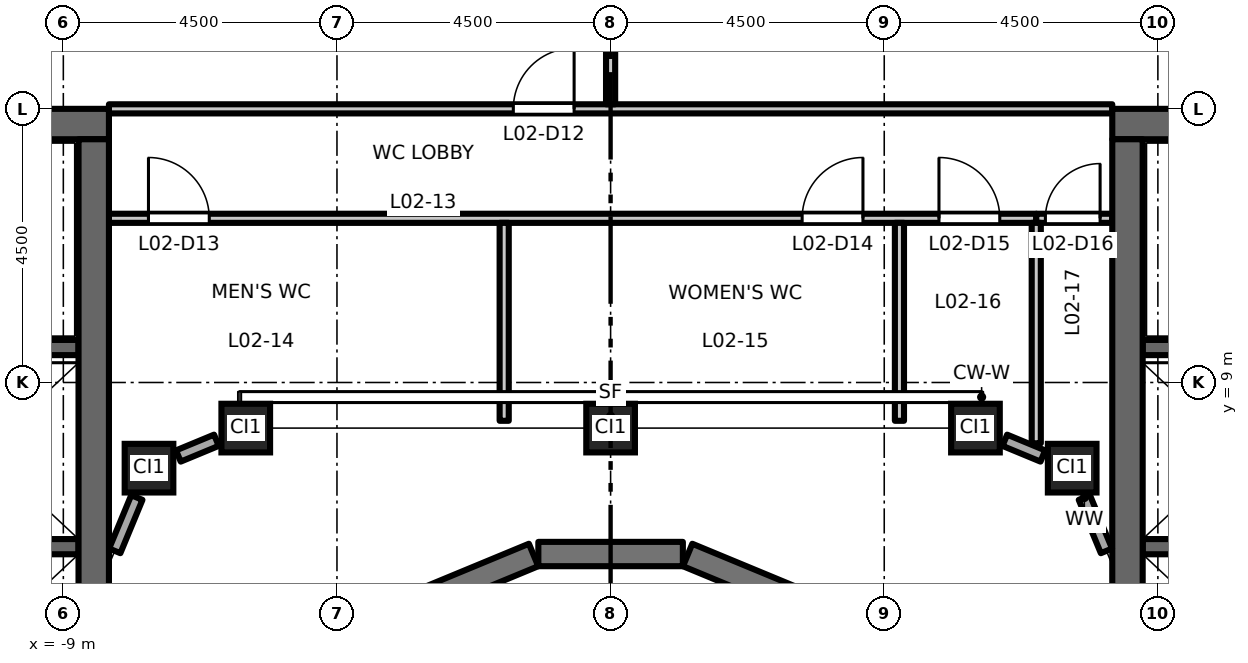
"""IFC4 building model, lengths in metres.
Left out: names, types, materials, properties, quantities, classifications, styles, units other than length and angle.
Written with IfcOpenShell. Run it as: python <this file> out.ifc"""

import sys

from ifc_helpers import new_model, si_unit, direction, frame, frame_2d, origin, origin_2d, place, context, subcontext, project, spatial, rectangle, hollow_rectangle, extrude, element, fill, save


model = new_model("IFC4")
c1 = context("Model", 3, precision=1e-05, world=origin(), true_north=direction((0.0, 1.0)))
c2 = subcontext(c1, "Body", "Model", "MODEL_VIEW")
j1 = project(units=[si_unit("LENGTHUNIT", "METRE"), si_unit("PLANEANGLEUNIT", "RADIAN")], contexts=[c1])
p1 = place(None, origin())
s1 = spatial("IfcSite", under=j1, at=p1, CompositionType="ELEMENT")
p2 = place(p1, origin())
s2 = spatial("IfcBuilding", under=s1, at=p2, CompositionType="ELEMENT")
p3 = place(p2, frame((0.0, 0.0, 12.2)))
s3 = spatial("IfcBuildingStorey", under=s2, at=p3, CompositionType="ELEMENT", Elevation=12.2)
for number, where, z_axis, x_axis in (
    (1, (-7.591, 7.591, 0.0), (0.0, 0.0, 1.0), (1.0, 0.0, 0.0)),
    (2, (-6.0, 8.25, 0.0), (0.0, 0.0, 1.0), (1.0, 0.0, 0.0)),
    (3, (0.0, 8.25, 0.0), (0.0, 0.0, 1.0), (1.0, 0.0, 0.0)),
    (4, (6.0, 8.25, 0.0), (0.0, 0.0, 1.0), (1.0, 0.0, 0.0)),
    (5, (7.591, 7.591, 0.0), (0.0, 0.0, 1.0), (1.0, 0.0, 0.0)),
):
    element("IfcColumn", number, at=place(p3, frame(where, z_axis=z_axis, x_axis=x_axis)), inside=s3, PredefinedType="COLUMN", context=c2, shape_type="SweptSolid", body=[
        extrude(hollow_rectangle(XDim=0.8, YDim=0.8, WallThickness=0.05, at=origin_2d()), origin(), (0.0, 0.0, 1.0), 5.0),
    ])
p4 = place(p3, frame((-8.75, 6.3, 0.0), z_axis=(0.0, 0.0, 1.0), x_axis=(-1.0, 0.0, 0.0)))
e6 = element("IfcWall", 6, at=p4, inside=s3, PredefinedType="SHEAR", context=c2, shape_type="SweptSolid", body=[
    extrude(rectangle(XDim=3.1, YDim=0.25, at=frame_2d((1.55, 0.0))), origin(), (0.0, 0.0, 1.0), 4.85),
])
p5 = place(p3, frame((-8.75, 9.575, 0.0), z_axis=(0.0, 0.0, 1.0), x_axis=(-1.0, 0.0, 0.0)))
e7 = element("IfcWall", 7, at=p5, inside=s3, PredefinedType="SHEAR", context=c2, shape_type="SweptSolid", body=[
    extrude(rectangle(XDim=8.0, YDim=0.25, at=frame_2d((4.0, 0.0))), origin(), (0.0, 0.0, 1.0), 4.85),
])
p6 = place(p5, frame((6.65, 0.0, 0.0)))
e8 = element("IfcOpeningElement", 8, at=p6, cuts=e7, PredefinedType="OPENING", context=c2, shape_type="SweptSolid", body=[
    extrude(rectangle(XDim=1.1, YDim=2.1, at=frame_2d((0.55, 1.05))), frame((0.0, 0.135, 0.0), z_axis=(0.0, -1.0, 0.0), x_axis=(1.0, 0.0, 0.0)), (0.0, 0.0, 1.0), 0.27),
])
p7 = place(p3, frame((-8.25, 13.25, 0.0), z_axis=(0.0, 0.0, 1.0), x_axis=(-1.0, 0.0, 0.0)))
e9 = element("IfcWall", 9, at=p7, inside=s3, PredefinedType="SHEAR", context=c2, shape_type="SweptSolid", body=[
    extrude(rectangle(XDim=13.5, YDim=0.5, at=frame_2d((6.75, 0.0))), origin(), (0.0, 0.0, 1.0), 4.85),
])
p8 = place(p3, frame((-8.5, -13.0, 0.0), z_axis=(0.0, 0.0, 1.0), x_axis=(0.0, 1.0, 0.0)))
e10 = element("IfcWall", 10, at=p8, inside=s3, PredefinedType="SHEAR", context=c2, shape_type="SweptSolid", body=[
    extrude(rectangle(XDim=26.0, YDim=0.5, at=frame_2d((13.0, 0.0))), origin(), (0.0, 0.0, 1.0), 4.85),
])
p9 = place(p3, frame((8.75, 6.3, 0.0), z_axis=(0.0, 0.0, 1.0), x_axis=(1.0, 0.0, 0.0)))
e11 = element("IfcWall", 11, at=p9, inside=s3, PredefinedType="SHEAR", context=c2, shape_type="SweptSolid", body=[
    extrude(rectangle(XDim=3.1, YDim=0.25, at=frame_2d((1.55, 0.0))), origin(), (0.0, 0.0, 1.0), 4.85),
])
p10 = place(p3, frame((8.75, 9.575, 0.0), z_axis=(0.0, 0.0, 1.0), x_axis=(1.0, 0.0, 0.0)))
e12 = element("IfcWall", 12, at=p10, inside=s3, PredefinedType="SHEAR", context=c2, shape_type="SweptSolid", body=[
    extrude(rectangle(XDim=8.0, YDim=0.25, at=frame_2d((4.0, 0.0))), origin(), (0.0, 0.0, 1.0), 4.85),
])
p11 = place(p10, frame((6.65, 0.0, 0.0)))
e13 = element("IfcOpeningElement", 13, at=p11, cuts=e12, PredefinedType="OPENING", context=c2, shape_type="SweptSolid", body=[
    extrude(rectangle(XDim=1.1, YDim=2.1, at=frame_2d((0.55, 1.05))), frame((0.0, 0.135, 0.0), z_axis=(0.0, -1.0, 0.0), x_axis=(1.0, 0.0, 0.0)), (0.0, 0.0, 1.0), 0.27),
])
p12 = place(p3, frame((8.25, 13.25, 0.0), z_axis=(0.0, 0.0, 1.0), x_axis=(1.0, 0.0, 0.0)))
e14 = element("IfcWall", 14, at=p12, inside=s3, PredefinedType="SHEAR", context=c2, shape_type="SweptSolid", body=[
    extrude(rectangle(XDim=13.5, YDim=0.5, at=frame_2d((6.75, 0.0))), origin(), (0.0, 0.0, 1.0), 4.85),
])
p13 = place(p3, frame((8.5, -13.0, 0.0), z_axis=(0.0, 0.0, 1.0), x_axis=(0.0, 1.0, 0.0)))
e15 = element("IfcWall", 15, at=p13, inside=s3, PredefinedType="SHEAR", context=c2, shape_type="SweptSolid", body=[
    extrude(rectangle(XDim=26.0, YDim=0.5, at=frame_2d((13.0, 0.0))), origin(), (0.0, 0.0, 1.0), 4.85),
])
p14 = place(p3, frame((8.154, 6.231, 0.0), z_axis=(0.0, 0.0, 1.0), x_axis=(-0.382624318388, 0.923904016107, 0.0)))
e16 = element("IfcWall", 16, at=p14, inside=s3, PredefinedType="STANDARD", context=c2, shape_type="SweptSolid", body=[
    extrude(rectangle(XDim=0.949, YDim=0.2, at=frame_2d((0.475, 0.0))), origin(), (0.0, 0.0, 1.0), 4.23),
])
for number, where, z_axis, x_axis in (
    (17, (7.108, 7.791, 0.0), (0.0, 0.0, 1.0), (-0.924, 0.383, 0.0)),
    (18, (-6.483, 8.05, 0.0), (0.0, 0.0, 1.0), (-0.924, -0.383, 0.0)),
):
    element("IfcWall", number, at=place(p3, frame(where, z_axis=z_axis, x_axis=x_axis)), inside=s3, PredefinedType="STANDARD", context=c2, shape_type="SweptSolid", body=[
        extrude(rectangle(XDim=0.677, YDim=0.2, at=frame_2d((0.338, 0.0))), origin(), (0.0, 0.0, 1.0), 4.23),
    ])
p15 = place(p3, frame((-7.791, 7.108, 0.0), z_axis=(0.0, 0.0, 1.0), x_axis=(-0.382624318388, -0.923904016107, 0.0)))
e19 = element("IfcWall", 19, at=p15, inside=s3, PredefinedType="STANDARD", context=c2, shape_type="SweptSolid", body=[
    extrude(rectangle(XDim=0.949, YDim=0.2, at=frame_2d((0.475, 0.0))), origin(), (0.0, 0.0, 1.0), 4.23),
])
for number, where, z_axis, x_axis in (
    (20, (3.462, 5.254, 0.0), (0.0, 0.0, 1.0), (-0.924, 0.383, 0.0)),
    (21, (1.188, 6.179, 0.0), (0.0, 0.0, 1.0), (-1.0, 0.0, 0.0)),
    (22, (-1.267, 6.163, 0.0), (0.0, 0.0, 1.0), (-0.924, -0.383, 0.0)),
):
    element("IfcWall", number, at=place(p3, frame(where, z_axis=z_axis, x_axis=x_axis)), inside=s3, PredefinedType="SOLIDWALL", context=c2, shape_type="SweptSolid", body=[
        extrude(rectangle(XDim=2.376, YDim=0.4, at=frame_2d((1.188, 0.0))), origin(), (0.0, 0.0, 1.0), 4.7),
    ])
p16 = place(p3, frame((-8.25, 11.7, 0.0), z_axis=(0.0, 0.0, 1.0), x_axis=(1.0, 0.0, 0.0)))
e23 = element("IfcWall", 23, at=p16, inside=s3, PredefinedType="PARTITIONING", context=c2, shape_type="SweptSolid", body=[
    extrude(rectangle(XDim=15.25, YDim=0.15, at=frame_2d((7.625, 0.0))), origin(), (0.0, 0.0, 1.0), 4.85),
])
p17 = place(p16, frame((0.65, 0.0, 0.0)))
e24 = element("IfcOpeningElement", 24, at=p17, cuts=e23, PredefinedType="OPENING", context=c2, shape_type="SweptSolid", body=[
    extrude(rectangle(XDim=1.0, YDim=2.1, at=frame_2d((0.5, 1.05))), frame((0.0, 0.085, 0.0), z_axis=(0.0, -1.0, 0.0), x_axis=(1.0, 0.0, 0.0)), (0.0, 0.0, 1.0), 0.17),
])
p18 = place(p16, frame((11.4, 0.0, 0.0)))
e25 = element("IfcOpeningElement", 25, at=p18, cuts=e23, PredefinedType="OPENING", context=c2, shape_type="SweptSolid", body=[
    extrude(rectangle(XDim=1.0, YDim=2.1, at=frame_2d((0.5, 1.05))), frame((0.0, 0.085, 0.0), z_axis=(0.0, -1.0, 0.0), x_axis=(1.0, 0.0, 0.0)), (0.0, 0.0, 1.0), 0.17),
])
p19 = place(p16, frame((13.65, 0.0, 0.0)))
e26 = element("IfcOpeningElement", 26, at=p19, cuts=e23, PredefinedType="OPENING", context=c2, shape_type="SweptSolid", body=[
    extrude(rectangle(XDim=1.0, YDim=2.1, at=frame_2d((0.5, 1.05))), frame((0.0, 0.085, 0.0), z_axis=(0.0, -1.0, 0.0), x_axis=(1.0, 0.0, 0.0)), (0.0, 0.0, 1.0), 0.17),
])
p20 = place(p3, frame((7.0, 11.7, 0.0), z_axis=(0.0, 0.0, 1.0), x_axis=(1.0, 0.0, 0.0)))
e27 = element("IfcWall", 27, at=p20, inside=s3, PredefinedType="PARTITIONING", context=c2, shape_type="SweptSolid", body=[
    extrude(rectangle(XDim=1.25, YDim=0.15, at=frame_2d((0.625, 0.0))), origin(), (0.0, 0.0, 1.0), 4.85),
])
p21 = place(p20, frame((0.15, 0.0, 0.0)))
e28 = element("IfcOpeningElement", 28, at=p21, cuts=e27, PredefinedType="OPENING", context=c2, shape_type="SweptSolid", body=[
    extrude(rectangle(XDim=0.9, YDim=2.1, at=frame_2d((0.45, 1.05))), frame((0.0, 0.085, 0.0), z_axis=(0.0, -1.0, 0.0), x_axis=(1.0, 0.0, 0.0)), (0.0, 0.0, 1.0), 0.17),
])
p22 = place(p3, frame((-8.25, 13.5, 0.0), z_axis=(0.0, 0.0, 1.0), x_axis=(1.0, 0.0, 0.0)))
e29 = element("IfcWall", 29, at=p22, inside=s3, PredefinedType="PARTITIONING", context=c2, shape_type="SweptSolid", body=[
    extrude(rectangle(XDim=16.5, YDim=0.15, at=frame_2d((8.25, 0.0))), origin(), (0.0, 0.0, 1.0), 4.35),
])
p23 = place(p22, frame((6.65, 0.0, 0.0)))
e30 = element("IfcOpeningElement", 30, at=p23, cuts=e29, PredefinedType="OPENING", context=c2, shape_type="SweptSolid", body=[
    extrude(rectangle(XDim=1.0, YDim=2.1, at=frame_2d((0.5, 1.05))), frame((0.0, 0.085, 0.0), z_axis=(0.0, -1.0, 0.0), x_axis=(1.0, 0.0, 0.0)), (0.0, 0.0, 1.0), 0.17),
])
p24 = place(p3, frame((-1.75, 8.37, 0.0), z_axis=(0.0, 0.0, 1.0), x_axis=(0.0, 1.0, 0.0)))
e31 = element("IfcWall", 31, at=p24, inside=s3, PredefinedType="PARTITIONING", context=c2, shape_type="SweptSolid", body=[
    extrude(rectangle(XDim=3.255, YDim=0.15, at=frame_2d((1.627, 0.0))), origin(), (0.0, 0.0, 1.0), 4.85),
])
p25 = place(p3, frame((0.0, 13.575, 0.0), z_axis=(0.0, 0.0, 1.0), x_axis=(0.0, 1.0, 0.0)))
e32 = element("IfcWall", 32, at=p25, inside=s3, PredefinedType="PARTITIONING", context=c2, shape_type="SweptSolid", body=[
    extrude(rectangle(XDim=7.35, YDim=0.15, at=frame_2d((3.675, 0.0))), origin(), (0.0, 0.0, 1.0), 4.85),
])
p26 = place(p25, frame((5.775, 0.0, 0.0)))
e33 = element("IfcOpeningElement", 33, at=p26, cuts=e32, PredefinedType="OPENING", context=c2, shape_type="SweptSolid", body=[
    extrude(rectangle(XDim=1.0, YDim=2.1, at=frame_2d((0.5, 1.05))), frame((0.0, 0.085, 0.0), z_axis=(0.0, -1.0, 0.0), x_axis=(1.0, 0.0, 0.0)), (0.0, 0.0, 1.0), 0.17),
])
p27 = place(p3, frame((4.75, 8.37, 0.0), z_axis=(0.0, 0.0, 1.0), x_axis=(0.0, 1.0, 0.0)))
e34 = element("IfcWall", 34, at=p27, inside=s3, PredefinedType="PARTITIONING", context=c2, shape_type="SweptSolid", body=[
    extrude(rectangle(XDim=3.255, YDim=0.15, at=frame_2d((1.627, 0.0))), origin(), (0.0, 0.0, 1.0), 4.85),
])
p28 = place(p3, frame((7.0, 8.0, 0.0), z_axis=(0.0, 0.0, 1.0), x_axis=(0.0, 1.0, 0.0)))
e35 = element("IfcWall", 35, at=p28, inside=s3, PredefinedType="PARTITIONING", context=c2, shape_type="SweptSolid", body=[
    extrude(rectangle(XDim=3.625, YDim=0.15, at=frame_2d((1.812, 0.0))), origin(), (0.0, 0.0, 1.0), 4.85),
])
p29 = place(p23, origin())
e36 = element("IfcDoor", 36, at=p29, inside=s3, OperationType="SINGLE_SWING_RIGHT", PredefinedType="DOOR", context=c2, shape_type="SweptSolid", body=[
    extrude(rectangle(XDim=1.0, YDim=2.1, at=frame_2d((0.5, 1.05))), frame((0.0, 0.025, 0.0), z_axis=(0.0, -1.0, 0.0), x_axis=(1.0, 0.0, 0.0)), (0.0, 0.0, 1.0), 0.05),
])
fill(e30, e36)
p30 = place(p17, origin())
e37 = element("IfcDoor", 37, at=p30, inside=s3, OperationType="SINGLE_SWING_LEFT", PredefinedType="DOOR", context=c2, shape_type="SweptSolid", body=[
    extrude(rectangle(XDim=1.0, YDim=2.1, at=frame_2d((0.5, 1.05))), frame((0.0, 0.025, 0.0), z_axis=(0.0, -1.0, 0.0), x_axis=(1.0, 0.0, 0.0)), (0.0, 0.0, 1.0), 0.05),
])
fill(e24, e37)
p31 = place(p18, origin())
e38 = element("IfcDoor", 38, at=p31, inside=s3, OperationType="SINGLE_SWING_RIGHT", PredefinedType="DOOR", context=c2, shape_type="SweptSolid", body=[
    extrude(rectangle(XDim=1.0, YDim=2.1, at=frame_2d((0.5, 1.05))), frame((0.0, 0.025, 0.0), z_axis=(0.0, -1.0, 0.0), x_axis=(1.0, 0.0, 0.0)), (0.0, 0.0, 1.0), 0.05),
])
fill(e25, e38)
p32 = place(p19, origin())
e39 = element("IfcDoor", 39, at=p32, inside=s3, OperationType="SINGLE_SWING_LEFT", PredefinedType="DOOR", context=c2, shape_type="SweptSolid", body=[
    extrude(rectangle(XDim=1.0, YDim=2.1, at=frame_2d((0.5, 1.05))), frame((0.0, 0.025, 0.0), z_axis=(0.0, -1.0, 0.0), x_axis=(1.0, 0.0, 0.0)), (0.0, 0.0, 1.0), 0.05),
])
fill(e26, e39)
p33 = place(p21, origin())
e40 = element("IfcDoor", 40, at=p33, inside=s3, OperationType="SINGLE_SWING_RIGHT", PredefinedType="DOOR", context=c2, shape_type="SweptSolid", body=[
    extrude(rectangle(XDim=0.9, YDim=2.1, at=frame_2d((0.45, 1.05))), frame((0.0, 0.025, 0.0), z_axis=(0.0, -1.0, 0.0), x_axis=(1.0, 0.0, 0.0)), (0.0, 0.0, 1.0), 0.05),
])
fill(e28, e40)
save(model, sys.argv[1])
